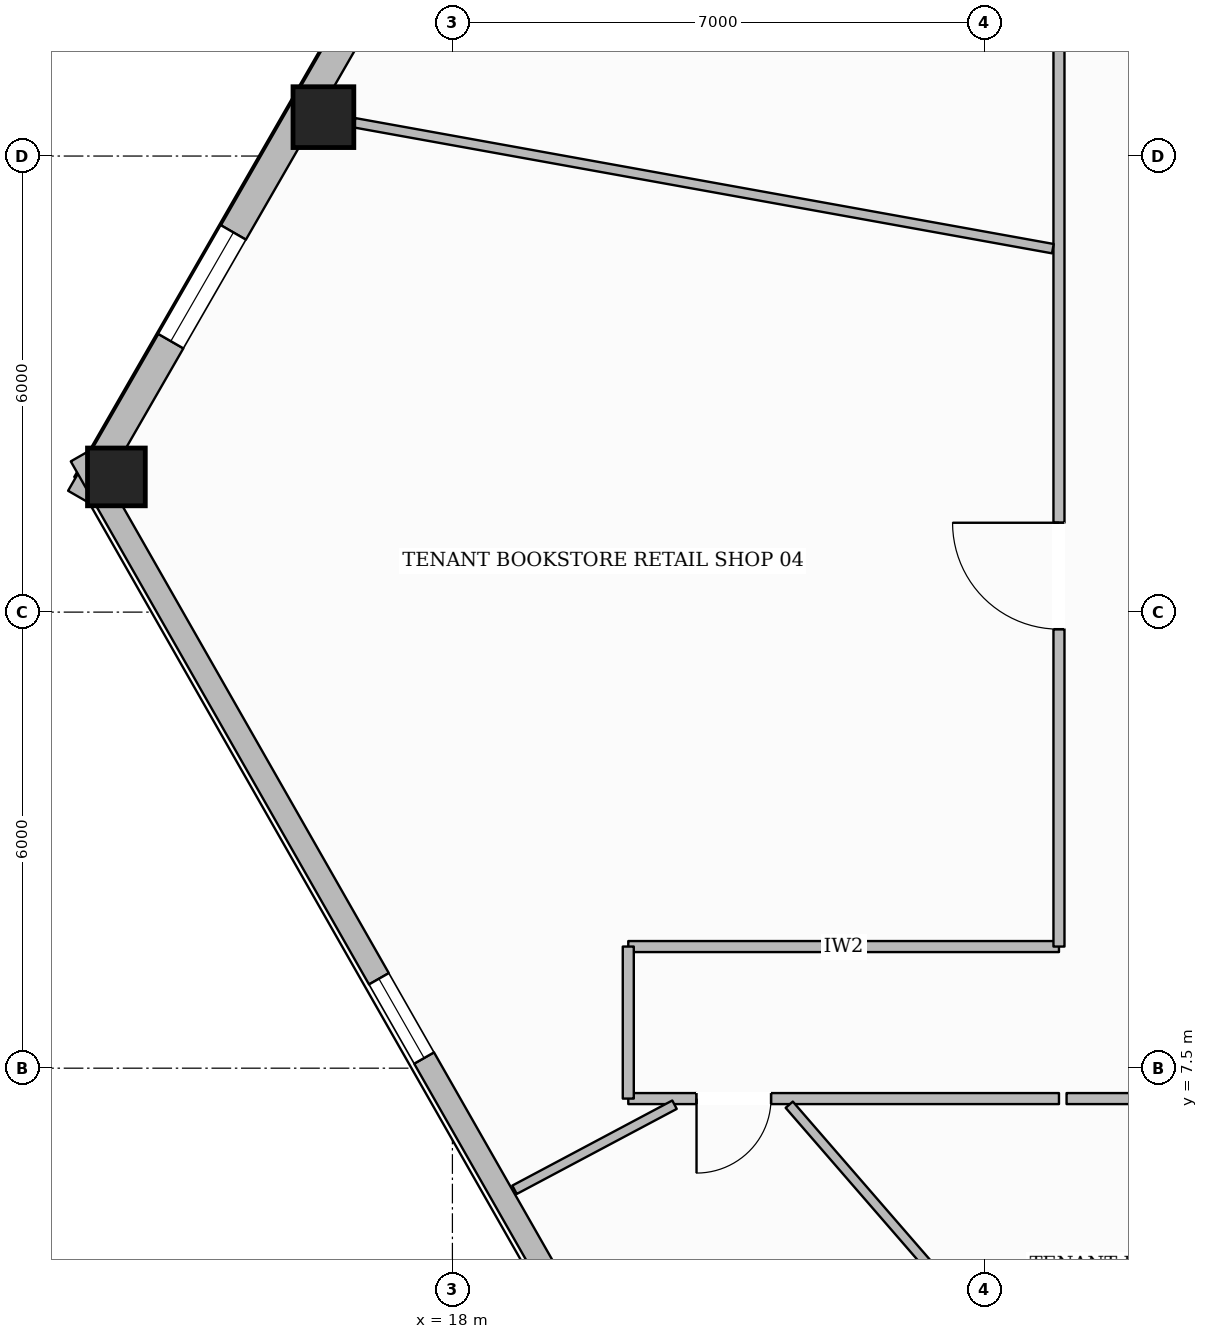
"""IFC4 building model, lengths in metres.
Left out: names, types, materials, properties, quantities, classifications, styles, units other than length and angle.
Written with IfcOpenShell. Run it as: python <this file> out.ifc"""

import sys

from ifc_helpers import new_model, si_unit, direction, frame, frame_2d, origin, origin_2d, place, context, subcontext, project, spatial, rectangle, hollow_rectangle, extrude, element, fill, save


model = new_model("IFC4")
c1 = context("Model", 3, precision=1e-05, world=origin(), true_north=direction((0.0, 1.0)))
c2 = subcontext(c1, "Body", "Model", "MODEL_VIEW")
j1 = project(units=[si_unit("LENGTHUNIT", "METRE"), si_unit("PLANEANGLEUNIT", "RADIAN")], contexts=[c1])
p1 = place(None, origin())
s1 = spatial("IfcSite", under=j1, at=p1, CompositionType="ELEMENT")
p2 = place(p1, origin())
s2 = spatial("IfcBuilding", under=s1, at=p2, CompositionType="ELEMENT")
p3 = place(p2, frame((0.0, 0.0, 13.7)))
s3 = spatial("IfcBuildingStorey", under=s2, at=p3, CompositionType="ELEMENT", Elevation=13.7)
p4 = place(p3, frame((16.303, 20.012, 0.0), z_axis=(0.0, 0.0, 1.0), x_axis=(1.0, 0.0, 0.0)))
e1 = element("IfcColumn", 1, at=p4, inside=s3, PredefinedType="COLUMN", context=c2, shape_type="SweptSolid", body=[
    extrude(hollow_rectangle(XDim=0.8, YDim=0.8, WallThickness=0.036, at=origin_2d()), origin(), (0.0, 0.0, 1.0), 3.59),
])
p5 = place(p3, frame((13.579, 15.279, 0.0), z_axis=(0.0, 0.0, 1.0), x_axis=(1.0, 0.0, 0.0)))
e2 = element("IfcColumn", 2, at=p5, inside=s3, PredefinedType="COLUMN", context=c2, shape_type="SweptSolid", body=[
    extrude(hollow_rectangle(XDim=0.76, YDim=0.76, WallThickness=0.035, at=origin_2d()), origin(), (0.0, 0.0, 1.0), 3.59),
])
p6 = place(p3, frame((13.108, 15.002, 0.0), z_axis=(0.0, 0.0, 1.0), x_axis=(0.498757610738, 0.866741510331, 0.0)))
e3 = element("IfcWall", 3, at=p6, inside=s3, PredefinedType="STANDARD", context=c2, shape_type="SweptSolid", body=[
    extrude(rectangle(XDim=33.716, YDim=0.38, at=frame_2d((16.858, 0.0))), origin(), (0.0, 0.0, 1.0), 2.97),
])
p7 = place(p6, frame((29.684, 0.0, 0.65)))
e4 = element("IfcOpeningElement", 4, at=p7, cuts=e3, PredefinedType="OPENING", context=c2, shape_type="SweptSolid", body=[
    extrude(rectangle(XDim=1.65, YDim=1.75, at=frame_2d((0.825, 0.875))), frame((0.0, 0.2, 0.0), z_axis=(0.0, -1.0, 0.0), x_axis=(1.0, 0.0, 0.0)), (0.0, 0.0, 1.0), 0.4),
])
p8 = place(p6, frame((24.223, 0.0, 0.65)))
e5 = element("IfcOpeningElement", 5, at=p8, cuts=e3, PredefinedType="OPENING", context=c2, shape_type="SweptSolid", body=[
    extrude(rectangle(XDim=1.65, YDim=1.75, at=frame_2d((0.825, 0.875))), frame((0.0, 0.2, 0.0), z_axis=(0.0, -1.0, 0.0), x_axis=(1.0, 0.0, 0.0)), (0.0, 0.0, 1.0), 0.4),
])
p9 = place(p6, frame((13.302, 0.0, 0.65)))
e6 = element("IfcOpeningElement", 6, at=p9, cuts=e3, PredefinedType="OPENING", context=c2, shape_type="SweptSolid", body=[
    extrude(rectangle(XDim=1.65, YDim=1.75, at=frame_2d((0.825, 0.875))), frame((0.0, 0.2, 0.0), z_axis=(0.0, -1.0, 0.0), x_axis=(1.0, 0.0, 0.0)), (0.0, 0.0, 1.0), 0.4),
])
p10 = place(p6, frame((7.841, 0.0, 0.65)))
e7 = element("IfcOpeningElement", 7, at=p10, cuts=e3, PredefinedType="OPENING", context=c2, shape_type="SweptSolid", body=[
    extrude(rectangle(XDim=1.65, YDim=1.75, at=frame_2d((0.825, 0.875))), frame((0.0, 0.2, 0.0), z_axis=(0.0, -1.0, 0.0), x_axis=(1.0, 0.0, 0.0)), (0.0, 0.0, 1.0), 0.4),
])
p11 = place(p6, frame((2.38, 0.0, 0.65)))
e8 = element("IfcOpeningElement", 8, at=p11, cuts=e3, PredefinedType="OPENING", context=c2, shape_type="SweptSolid", body=[
    extrude(rectangle(XDim=1.65, YDim=1.75, at=frame_2d((0.825, 0.875))), frame((0.0, 0.2, 0.0), z_axis=(0.0, -1.0, 0.0), x_axis=(1.0, 0.0, 0.0)), (0.0, 0.0, 1.0), 0.4),
])
p12 = place(p3, frame((21.551, 0.752, 0.0), z_axis=(0.0, 0.0, 1.0), x_axis=(-0.495301001615, 0.868721427041, 0.0)))
e9 = element("IfcWall", 9, at=p12, inside=s3, PredefinedType="STANDARD", context=c2, shape_type="SweptSolid", body=[
    extrude(rectangle(XDim=17.042, YDim=0.3, at=frame_2d((8.521, 0.0))), origin(), (0.0, 0.0, 1.0), 2.97),
])
p13 = place(p12, frame((7.921, 0.0, 0.65)))
e10 = element("IfcOpeningElement", 10, at=p13, cuts=e9, PredefinedType="OPENING", context=c2, shape_type="SweptSolid", body=[
    extrude(rectangle(XDim=1.2, YDim=1.7, at=frame_2d((0.6, 0.85))), frame((0.0, 0.16, 0.0), z_axis=(0.0, -1.0, 0.0), x_axis=(1.0, 0.0, 0.0)), (0.0, 0.0, 1.0), 0.32),
])
p14 = place(p3, frame((20.314, 9.1, 0.0), z_axis=(0.0, 0.0, 1.0), x_axis=(1.0, 0.0, 0.0)))
e11 = element("IfcWall", 11, at=p14, inside=s3, PredefinedType="PARTITIONING", context=c2, shape_type="SweptSolid", body=[
    extrude(rectangle(XDim=5.666, YDim=0.145, at=frame_2d((2.833, 0.0))), origin(), (0.0, 0.0, 1.0), 3.59),
])
p15 = place(p3, frame((25.98, 9.1, 0.0), z_axis=(0.0, 0.0, 1.0), x_axis=(0.0, 1.0, 0.0)))
e12 = element("IfcWall", 12, at=p15, inside=s3, PredefinedType="PARTITIONING", context=c2, shape_type="SweptSolid", body=[
    extrude(rectangle(XDim=16.0, YDim=0.145, at=frame_2d((8.0, 0.0))), origin(), (0.0, 0.0, 1.0), 3.278),
])
p16 = place(p15, frame((4.176, 0.0, 0.0)))
e13 = element("IfcOpeningElement", 13, at=p16, cuts=e12, PredefinedType="OPENING", context=c2, shape_type="SweptSolid", body=[
    extrude(rectangle(XDim=1.4, YDim=2.2, at=frame_2d((0.7, 1.1))), frame((0.0, 0.083, 0.0), z_axis=(0.0, -1.0, 0.0), x_axis=(1.0, 0.0, 0.0)), (0.0, 0.0, 1.0), 0.165),
])
p17 = place(p3, frame((49.92, 7.1, 0.0), z_axis=(0.0, 0.0, 1.0), x_axis=(-1.0, 0.0, 0.0)))
e14 = element("IfcWall", 14, at=p17, inside=s3, PredefinedType="PARTITIONING", context=c2, shape_type="SweptSolid", body=[
    extrude(rectangle(XDim=23.84, YDim=0.145, at=frame_2d((11.92, 0.0))), origin(), (0.0, 0.0, 1.0), 3.278),
])
p18 = place(p17, frame((20.905, 0.0, 0.0)))
e15 = element("IfcOpeningElement", 15, at=p18, cuts=e14, PredefinedType="OPENING", context=c2, shape_type="SweptSolid", body=[
    extrude(rectangle(XDim=0.98, YDim=2.15, at=frame_2d((0.49, 1.075))), frame((0.0, 0.083, 0.0), z_axis=(0.0, -1.0, 0.0), x_axis=(1.0, 0.0, 0.0)), (0.0, 0.0, 1.0), 0.165),
])
p19 = place(p17, frame((11.339, 0.0, 0.0)))
e16 = element("IfcOpeningElement", 16, at=p19, cuts=e14, PredefinedType="OPENING", context=c2, shape_type="SweptSolid", body=[
    extrude(rectangle(XDim=1.4, YDim=2.2, at=frame_2d((0.7, 1.1))), frame((0.0, 0.083, 0.0), z_axis=(0.0, -1.0, 0.0), x_axis=(1.0, 0.0, 0.0)), (0.0, 0.0, 1.0), 0.165),
])
p20 = place(p3, frame((25.98, 7.1, 0.0), z_axis=(0.0, 0.0, 1.0), x_axis=(-1.0, 0.0, 0.0)))
e17 = element("IfcWall", 17, at=p20, inside=s3, PredefinedType="PARTITIONING", context=c2, shape_type="SweptSolid", body=[
    extrude(rectangle(XDim=5.666, YDim=0.145, at=frame_2d((2.833, 0.0))), origin(), (0.0, 0.0, 1.0), 3.59),
])
p21 = place(p20, frame((3.788, 0.0, 0.0)))
e18 = element("IfcOpeningElement", 18, at=p21, cuts=e17, PredefinedType="OPENING", context=c2, shape_type="SweptSolid", body=[
    extrude(rectangle(XDim=0.98, YDim=2.15, at=frame_2d((0.49, 1.075))), frame((0.0, 0.083, 0.0), z_axis=(0.0, -1.0, 0.0), x_axis=(1.0, 0.0, 0.0)), (0.0, 0.0, 1.0), 0.165),
])
p22 = place(p3, frame((20.314, 7.1, 0.0), z_axis=(0.0, 0.0, 1.0), x_axis=(0.0, 1.0, 0.0)))
e19 = element("IfcWall", 19, at=p22, inside=s3, PredefinedType="PARTITIONING", context=c2, shape_type="SweptSolid", body=[
    extrude(rectangle(XDim=2.0, YDim=0.145, at=frame_2d((1.0, 0.0))), origin(), (0.0, 0.0, 1.0), 3.59),
])
p23 = place(p3, frame((25.899, 18.281, 0.0), z_axis=(0.0, 0.0, 1.0), x_axis=(-0.984135326531, 0.177419443897, 0.0)))
e20 = element("IfcWall", 20, at=p23, inside=s3, PredefinedType="PARTITIONING", context=c2, shape_type="SweptSolid", body=[
    extrude(rectangle(XDim=9.337, YDim=0.125, at=frame_2d((4.668, 0.0))), origin(), (0.0, 0.0, 1.0), 3.057),
])
p24 = place(p3, frame((20.922, 7.02, 0.0), z_axis=(0.0, 0.0, 1.0), x_axis=(-0.882964518008, -0.469439729825, 0.0)))
e21 = element("IfcWall", 21, at=p24, inside=s3, PredefinedType="PARTITIONING", context=c2, shape_type="SweptSolid", body=[
    extrude(rectangle(XDim=2.384, YDim=0.125, at=frame_2d((1.192, 0.0))), origin(), (0.0, 0.0, 1.0), 3.59),
])
p25 = place(p3, frame((22.431, 7.02, 0.0), z_axis=(0.0, 0.0, 1.0), x_axis=(0.655156305275, -0.75549335911, 0.0)))
e22 = element("IfcWall", 22, at=p25, inside=s3, PredefinedType="PARTITIONING", context=c2, shape_type="SweptSolid", body=[
    extrude(rectangle(XDim=6.998, YDim=0.125, at=frame_2d((3.499, 0.0))), origin(), (0.0, 0.0, 1.0), 3.59),
])
p26 = place(p11, origin())
e23 = element("IfcWindow", 23, at=p26, inside=s3, PartitioningType="SINGLE_PANEL", PredefinedType="WINDOW", context=c2, shape_type="SweptSolid", body=[
    extrude(rectangle(XDim=1.65, YDim=1.75, at=frame_2d((0.825, 0.875))), frame((0.0, 0.03, 0.0), z_axis=(0.0, -1.0, 0.0), x_axis=(1.0, 0.0, 0.0)), (0.0, 0.0, 1.0), 0.06),
])
fill(e8, e23)
p27 = place(p13, origin())
e24 = element("IfcWindow", 24, at=p27, inside=s3, PartitioningType="SINGLE_PANEL", PredefinedType="WINDOW", context=c2, shape_type="SweptSolid", body=[
    extrude(rectangle(XDim=1.2, YDim=1.7, at=frame_2d((0.6, 0.85))), frame((0.0, 0.03, 0.0), z_axis=(0.0, -1.0, 0.0), x_axis=(1.0, 0.0, 0.0)), (0.0, 0.0, 1.0), 0.06),
])
fill(e10, e24)
p28 = place(p16, origin())
e25 = element("IfcDoor", 25, at=p28, inside=s3, OperationType="SINGLE_SWING_RIGHT", PredefinedType="DOOR", context=c2, shape_type="SweptSolid", body=[
    extrude(rectangle(XDim=1.4, YDim=2.2, at=frame_2d((0.7, 1.1))), frame((0.0, 0.025, 0.0), z_axis=(0.0, -1.0, 0.0), x_axis=(1.0, 0.0, 0.0)), (0.0, 0.0, 1.0), 0.05),
])
fill(e13, e25)
p29 = place(p21, origin())
e26 = element("IfcDoor", 26, at=p29, inside=s3, OperationType="SINGLE_SWING_RIGHT", PredefinedType="DOOR", context=c2, shape_type="SweptSolid", body=[
    extrude(rectangle(XDim=0.98, YDim=2.15, at=frame_2d((0.49, 1.075))), frame((0.0, 0.025, 0.0), z_axis=(0.0, -1.0, 0.0), x_axis=(1.0, 0.0, 0.0)), (0.0, 0.0, 1.0), 0.05),
])
fill(e18, e26)
save(model, sys.argv[1])
